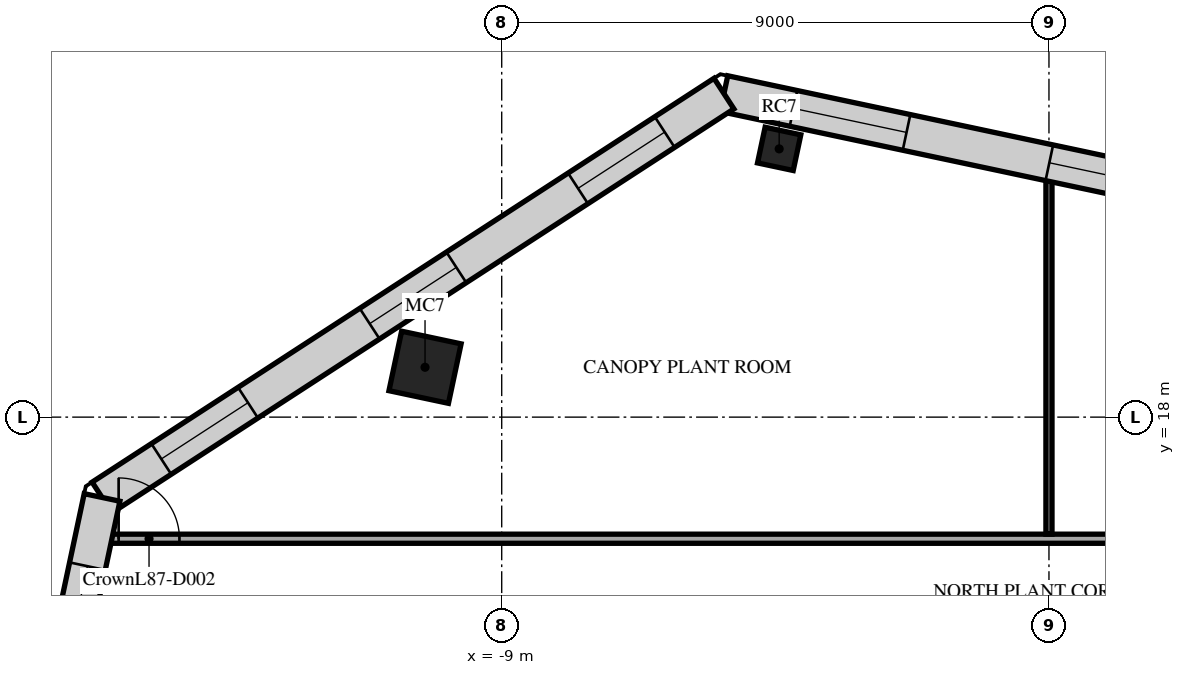
"""IFC4 building model, lengths in metres.
Left out: names, types, materials, properties, quantities, classifications, styles, units other than length and angle.
Written with IfcOpenShell. Run it as: python <this file> out.ifc"""

import sys

from ifc_helpers import new_model, si_unit, direction, frame, frame_2d, origin, origin_2d, place, context, subcontext, project, spatial, rectangle, extrude, element, fill, save


model = new_model("IFC4")
c1 = context("Model", 3, precision=1e-05, world=origin(), true_north=direction((0.0, 1.0)))
c2 = subcontext(c1, "Body", "Model", "MODEL_VIEW")
j1 = project(units=[si_unit("LENGTHUNIT", "METRE"), si_unit("PLANEANGLEUNIT", "RADIAN")], contexts=[c1])
p1 = place(None, origin())
s1 = spatial("IfcSite", under=j1, at=p1, CompositionType="ELEMENT")
p2 = place(p1, origin())
s2 = spatial("IfcBuilding", under=s1, at=p2, CompositionType="ELEMENT")
p3 = place(p2, frame((0.0, 0.0, 373.1)))
s3 = spatial("IfcBuildingStorey", under=s2, at=p3, CompositionType="ELEMENT", Elevation=373.1)
p4 = place(p3, frame((-10.261, 18.82, 0.0), z_axis=(0.0, 0.0, 1.0), x_axis=(0.207911690818, 0.978147600734, 0.0)))
e1 = element("IfcColumn", 1, at=p4, inside=s3, PredefinedType="COLUMN", context=c2, shape_type="SweptSolid", body=[
    extrude(rectangle(XDim=1.0, YDim=1.0, at=origin_2d()), origin(), (0.0, 0.0, 1.0), 3.5),
])
p5 = place(p3, frame((-4.437, 22.412, 0.0), z_axis=(0.0, 0.0, 1.0), x_axis=(0.207911690818, 0.978147600734, 0.0)))
e2 = element("IfcColumn", 2, at=p5, inside=s3, PredefinedType="COLUMN", context=c2, shape_type="SweptSolid", body=[
    extrude(rectangle(XDim=0.6, YDim=0.6, at=origin_2d()), origin(), (0.0, 0.0, 1.0), 3.5),
])
p6 = place(p3, frame((-15.615, 16.0, 0.0), z_axis=(0.0, 0.0, 1.0), x_axis=(1.0, 0.0, 0.0)))
e3 = element("IfcWall", 3, at=p6, inside=s3, PredefinedType="PARTITIONING", context=c2, shape_type="SweptSolid", body=[
    extrude(rectangle(XDim=31.689, YDim=0.15, at=frame_2d((15.845, 0.0))), origin(), (0.0, 0.0, 1.0), 2.63),
])
p7 = place(p6, frame((0.315, 0.0, 0.0)))
e4 = element("IfcOpeningElement", 4, at=p7, cuts=e3, PredefinedType="OPENING", context=c2, shape_type="SweptSolid", body=[
    extrude(rectangle(XDim=1.0, YDim=2.1, at=frame_2d((0.5, 1.05))), frame((0.0, 0.085, 0.0), z_axis=(0.0, -1.0, 0.0), x_axis=(1.0, 0.0, 0.0)), (0.0, 0.0, 1.0), 0.17),
])
p8 = place(p6, frame((23.115, 0.0, 0.0)))
e5 = element("IfcOpeningElement", 5, at=p8, cuts=e3, PredefinedType="OPENING", context=c2, shape_type="SweptSolid", body=[
    extrude(rectangle(XDim=1.0, YDim=2.1, at=frame_2d((0.5, 1.05))), frame((0.0, 0.085, 0.0), z_axis=(0.0, -1.0, 0.0), x_axis=(1.0, 0.0, 0.0)), (0.0, 0.0, 1.0), 0.17),
])
p9 = place(p3, frame((0.0, 16.075, 0.0), z_axis=(0.0, 0.0, 1.0), x_axis=(0.0, 1.0, 0.0)))
e6 = element("IfcWall", 6, at=p9, inside=s3, PredefinedType="PARTITIONING", context=c2, shape_type="SweptSolid", body=[
    extrude(rectangle(XDim=6.008, YDim=0.1, at=frame_2d((3.004, 0.0))), origin(), (0.0, 0.0, 1.0), 3.2),
])
p10 = place(p3, frame((15.751, 18.837, 0.0), z_axis=(0.0, 0.0, 1.0), x_axis=(-0.978148118813, 0.207909253431, 0.0)))
e7 = element("IfcWall", 7, at=p10, inside=s3, PredefinedType="STANDARD", context=c2, shape_type="SweptSolid", body=[
    extrude(rectangle(XDim=21.568, YDim=0.6, at=frame_2d((10.784, 0.0))), origin(), (0.0, 0.0, 1.0), 3.2),
])
p11 = place(p10, frame((1.169, 0.0, 0.6)))
e8 = element("IfcOpeningElement", 8, at=p11, cuts=e7, PredefinedType="OPENING", context=c2, shape_type="SweptSolid", body=[
    extrude(rectangle(XDim=1.9, YDim=1.85, at=frame_2d((0.95, 0.925))), frame((0.0, 0.31, 0.0), z_axis=(0.0, -1.0, 0.0), x_axis=(1.0, 0.0, 0.0)), (0.0, 0.0, 1.0), 0.62),
])
p12 = place(p10, frame((5.471, 0.0, 0.6)))
e9 = element("IfcOpeningElement", 9, at=p12, cuts=e7, PredefinedType="OPENING", context=c2, shape_type="SweptSolid", body=[
    extrude(rectangle(XDim=1.9, YDim=1.85, at=frame_2d((0.95, 0.925))), frame((0.0, 0.31, 0.0), z_axis=(0.0, -1.0, 0.0), x_axis=(1.0, 0.0, 0.0)), (0.0, 0.0, 1.0), 0.62),
])
p13 = place(p10, frame((9.834, 0.0, 0.6)))
e10 = element("IfcOpeningElement", 10, at=p13, cuts=e7, PredefinedType="OPENING", context=c2, shape_type="SweptSolid", body=[
    extrude(rectangle(XDim=1.9, YDim=1.85, at=frame_2d((0.95, 0.925))), frame((0.0, 0.31, 0.0), z_axis=(0.0, -1.0, 0.0), x_axis=(1.0, 0.0, 0.0)), (0.0, 0.0, 1.0), 0.62),
])
p14 = place(p10, frame((14.197, 0.0, 0.6)))
e11 = element("IfcOpeningElement", 11, at=p14, cuts=e7, PredefinedType="OPENING", context=c2, shape_type="SweptSolid", body=[
    extrude(rectangle(XDim=1.9, YDim=1.85, at=frame_2d((0.95, 0.925))), frame((0.0, 0.31, 0.0), z_axis=(0.0, -1.0, 0.0), x_axis=(1.0, 0.0, 0.0)), (0.0, 0.0, 1.0), 0.62),
])
p15 = place(p10, frame((18.498, 0.0, 0.6)))
e12 = element("IfcOpeningElement", 12, at=p15, cuts=e7, PredefinedType="OPENING", context=c2, shape_type="SweptSolid", body=[
    extrude(rectangle(XDim=1.9, YDim=1.85, at=frame_2d((0.95, 0.925))), frame((0.0, 0.31, 0.0), z_axis=(0.0, -1.0, 0.0), x_axis=(1.0, 0.0, 0.0)), (0.0, 0.0, 1.0), 0.62),
])
p16 = place(p3, frame((-5.345, 23.321, 0.0), z_axis=(0.0, 0.0, 1.0), x_axis=(-0.838670411522, -0.544639275887, 0.0)))
e13 = element("IfcWall", 13, at=p16, inside=s3, PredefinedType="STANDARD", context=c2, shape_type="SweptSolid", body=[
    extrude(rectangle(XDim=12.195, YDim=0.6, at=frame_2d((6.097, 0.0))), origin(), (0.0, 0.0, 1.0), 3.2),
])
p17 = place(p16, frame((1.162, 0.0, 0.6)))
e14 = element("IfcOpeningElement", 14, at=p17, cuts=e13, PredefinedType="OPENING", context=c2, shape_type="SweptSolid", body=[
    extrude(rectangle(XDim=1.7, YDim=1.85, at=frame_2d((0.85, 0.925))), frame((0.0, 0.31, 0.0), z_axis=(0.0, -1.0, 0.0), x_axis=(1.0, 0.0, 0.0)), (0.0, 0.0, 1.0), 0.62),
])
p18 = place(p16, frame((5.248, 0.0, 0.6)))
e15 = element("IfcOpeningElement", 15, at=p18, cuts=e13, PredefinedType="OPENING", context=c2, shape_type="SweptSolid", body=[
    extrude(rectangle(XDim=1.7, YDim=1.85, at=frame_2d((0.85, 0.925))), frame((0.0, 0.31, 0.0), z_axis=(0.0, -1.0, 0.0), x_axis=(1.0, 0.0, 0.0)), (0.0, 0.0, 1.0), 0.62),
])
p19 = place(p16, frame((9.333, 0.0, 0.6)))
e16 = element("IfcOpeningElement", 16, at=p19, cuts=e13, PredefinedType="OPENING", context=c2, shape_type="SweptSolid", body=[
    extrude(rectangle(XDim=1.7, YDim=1.85, at=frame_2d((0.85, 0.925))), frame((0.0, 0.31, 0.0), z_axis=(0.0, -1.0, 0.0), x_axis=(1.0, 0.0, 0.0)), (0.0, 0.0, 1.0), 0.62),
])
p20 = place(p3, frame((-15.573, 16.679, 0.0), z_axis=(0.0, 0.0, 1.0), x_axis=(-0.207912773383, -0.978147370627, 0.0)))
e17 = element("IfcWall", 17, at=p20, inside=s3, PredefinedType="STANDARD", context=c2, shape_type="SweptSolid", body=[
    extrude(rectangle(XDim=27.568, YDim=0.6, at=frame_2d((13.784, 0.0))), origin(), (0.0, 0.0, 1.0), 3.2),
])
p21 = place(p20, frame((1.156, 0.0, 0.6)))
e18 = element("IfcOpeningElement", 18, at=p21, cuts=e17, PredefinedType="OPENING", context=c2, shape_type="SweptSolid", body=[
    extrude(rectangle(XDim=2.2, YDim=1.85, at=frame_2d((1.1, 0.925))), frame((0.0, 0.31, 0.0), z_axis=(0.0, -1.0, 0.0), x_axis=(1.0, 0.0, 0.0)), (0.0, 0.0, 1.0), 0.62),
])
p22 = place(p20, frame((5.73, 0.0, 0.6)))
e19 = element("IfcOpeningElement", 19, at=p22, cuts=e17, PredefinedType="OPENING", context=c2, shape_type="SweptSolid", body=[
    extrude(rectangle(XDim=2.2, YDim=1.85, at=frame_2d((1.1, 0.925))), frame((0.0, 0.31, 0.0), z_axis=(0.0, -1.0, 0.0), x_axis=(1.0, 0.0, 0.0)), (0.0, 0.0, 1.0), 0.62),
])
p23 = place(p20, frame((10.366, 0.0, 0.6)))
e20 = element("IfcOpeningElement", 20, at=p23, cuts=e17, PredefinedType="OPENING", context=c2, shape_type="SweptSolid", body=[
    extrude(rectangle(XDim=2.2, YDim=1.85, at=frame_2d((1.1, 0.925))), frame((0.0, 0.31, 0.0), z_axis=(0.0, -1.0, 0.0), x_axis=(1.0, 0.0, 0.0)), (0.0, 0.0, 1.0), 0.62),
])
p24 = place(p20, frame((15.002, 0.0, 0.6)))
e21 = element("IfcOpeningElement", 21, at=p24, cuts=e17, PredefinedType="OPENING", context=c2, shape_type="SweptSolid", body=[
    extrude(rectangle(XDim=2.2, YDim=1.85, at=frame_2d((1.1, 0.925))), frame((0.0, 0.31, 0.0), z_axis=(0.0, -1.0, 0.0), x_axis=(1.0, 0.0, 0.0)), (0.0, 0.0, 1.0), 0.62),
])
p25 = place(p20, frame((19.638, 0.0, 0.6)))
e22 = element("IfcOpeningElement", 22, at=p25, cuts=e17, PredefinedType="OPENING", context=c2, shape_type="SweptSolid", body=[
    extrude(rectangle(XDim=2.2, YDim=1.85, at=frame_2d((1.1, 0.925))), frame((0.0, 0.31, 0.0), z_axis=(0.0, -1.0, 0.0), x_axis=(1.0, 0.0, 0.0)), (0.0, 0.0, 1.0), 0.62),
])
p26 = place(p20, frame((24.212, 0.0, 0.6)))
e23 = element("IfcOpeningElement", 23, at=p26, cuts=e17, PredefinedType="OPENING", context=c2, shape_type="SweptSolid", body=[
    extrude(rectangle(XDim=2.2, YDim=1.85, at=frame_2d((1.1, 0.925))), frame((0.0, 0.31, 0.0), z_axis=(0.0, -1.0, 0.0), x_axis=(1.0, 0.0, 0.0)), (0.0, 0.0, 1.0), 0.62),
])
p27 = place(p7, origin())
e24 = element("IfcDoor", 24, at=p27, inside=s3, OperationType="SINGLE_SWING_RIGHT", PredefinedType="DOOR", context=c2, shape_type="SweptSolid", body=[
    extrude(rectangle(XDim=1.0, YDim=2.1, at=frame_2d((0.5, 1.05))), frame((0.0, 0.025, 0.0), z_axis=(0.0, -1.0, 0.0), x_axis=(1.0, 0.0, 0.0)), (0.0, 0.0, 1.0), 0.05),
])
fill(e4, e24)
p28 = place(p14, origin())
e25 = element("IfcWindow", 25, at=p28, inside=s3, PartitioningType="SINGLE_PANEL", PredefinedType="USERDEFINED", context=c2, shape_type="SweptSolid", body=[
    extrude(rectangle(XDim=1.9, YDim=1.85, at=frame_2d((0.95, 0.925))), frame((0.0, 0.03, 0.0), z_axis=(0.0, -1.0, 0.0), x_axis=(1.0, 0.0, 0.0)), (0.0, 0.0, 1.0), 0.06),
])
fill(e11, e25)
p29 = place(p15, origin())
e26 = element("IfcWindow", 26, at=p29, inside=s3, PartitioningType="SINGLE_PANEL", PredefinedType="USERDEFINED", context=c2, shape_type="SweptSolid", body=[
    extrude(rectangle(XDim=1.9, YDim=1.85, at=frame_2d((0.95, 0.925))), frame((0.0, 0.03, 0.0), z_axis=(0.0, -1.0, 0.0), x_axis=(1.0, 0.0, 0.0)), (0.0, 0.0, 1.0), 0.06),
])
fill(e12, e26)
p30 = place(p17, origin())
e27 = element("IfcWindow", 27, at=p30, inside=s3, PartitioningType="SINGLE_PANEL", PredefinedType="USERDEFINED", context=c2, shape_type="SweptSolid", body=[
    extrude(rectangle(XDim=1.7, YDim=1.85, at=frame_2d((0.85, 0.925))), frame((0.0, 0.03, 0.0), z_axis=(0.0, -1.0, 0.0), x_axis=(1.0, 0.0, 0.0)), (0.0, 0.0, 1.0), 0.06),
])
fill(e14, e27)
p31 = place(p18, origin())
e28 = element("IfcWindow", 28, at=p31, inside=s3, PartitioningType="SINGLE_PANEL", PredefinedType="USERDEFINED", context=c2, shape_type="SweptSolid", body=[
    extrude(rectangle(XDim=1.7, YDim=1.85, at=frame_2d((0.85, 0.925))), frame((0.0, 0.03, 0.0), z_axis=(0.0, -1.0, 0.0), x_axis=(1.0, 0.0, 0.0)), (0.0, 0.0, 1.0), 0.06),
])
fill(e15, e28)
p32 = place(p19, origin())
e29 = element("IfcWindow", 29, at=p32, inside=s3, PartitioningType="SINGLE_PANEL", PredefinedType="USERDEFINED", context=c2, shape_type="SweptSolid", body=[
    extrude(rectangle(XDim=1.7, YDim=1.85, at=frame_2d((0.85, 0.925))), frame((0.0, 0.03, 0.0), z_axis=(0.0, -1.0, 0.0), x_axis=(1.0, 0.0, 0.0)), (0.0, 0.0, 1.0), 0.06),
])
fill(e16, e29)
p33 = place(p21, origin())
e30 = element("IfcWindow", 30, at=p33, inside=s3, PartitioningType="SINGLE_PANEL", PredefinedType="USERDEFINED", context=c2, shape_type="SweptSolid", body=[
    extrude(rectangle(XDim=2.2, YDim=1.85, at=frame_2d((1.1, 0.925))), frame((0.0, 0.03, 0.0), z_axis=(0.0, -1.0, 0.0), x_axis=(1.0, 0.0, 0.0)), (0.0, 0.0, 1.0), 0.06),
])
fill(e18, e30)
save(model, sys.argv[1])
